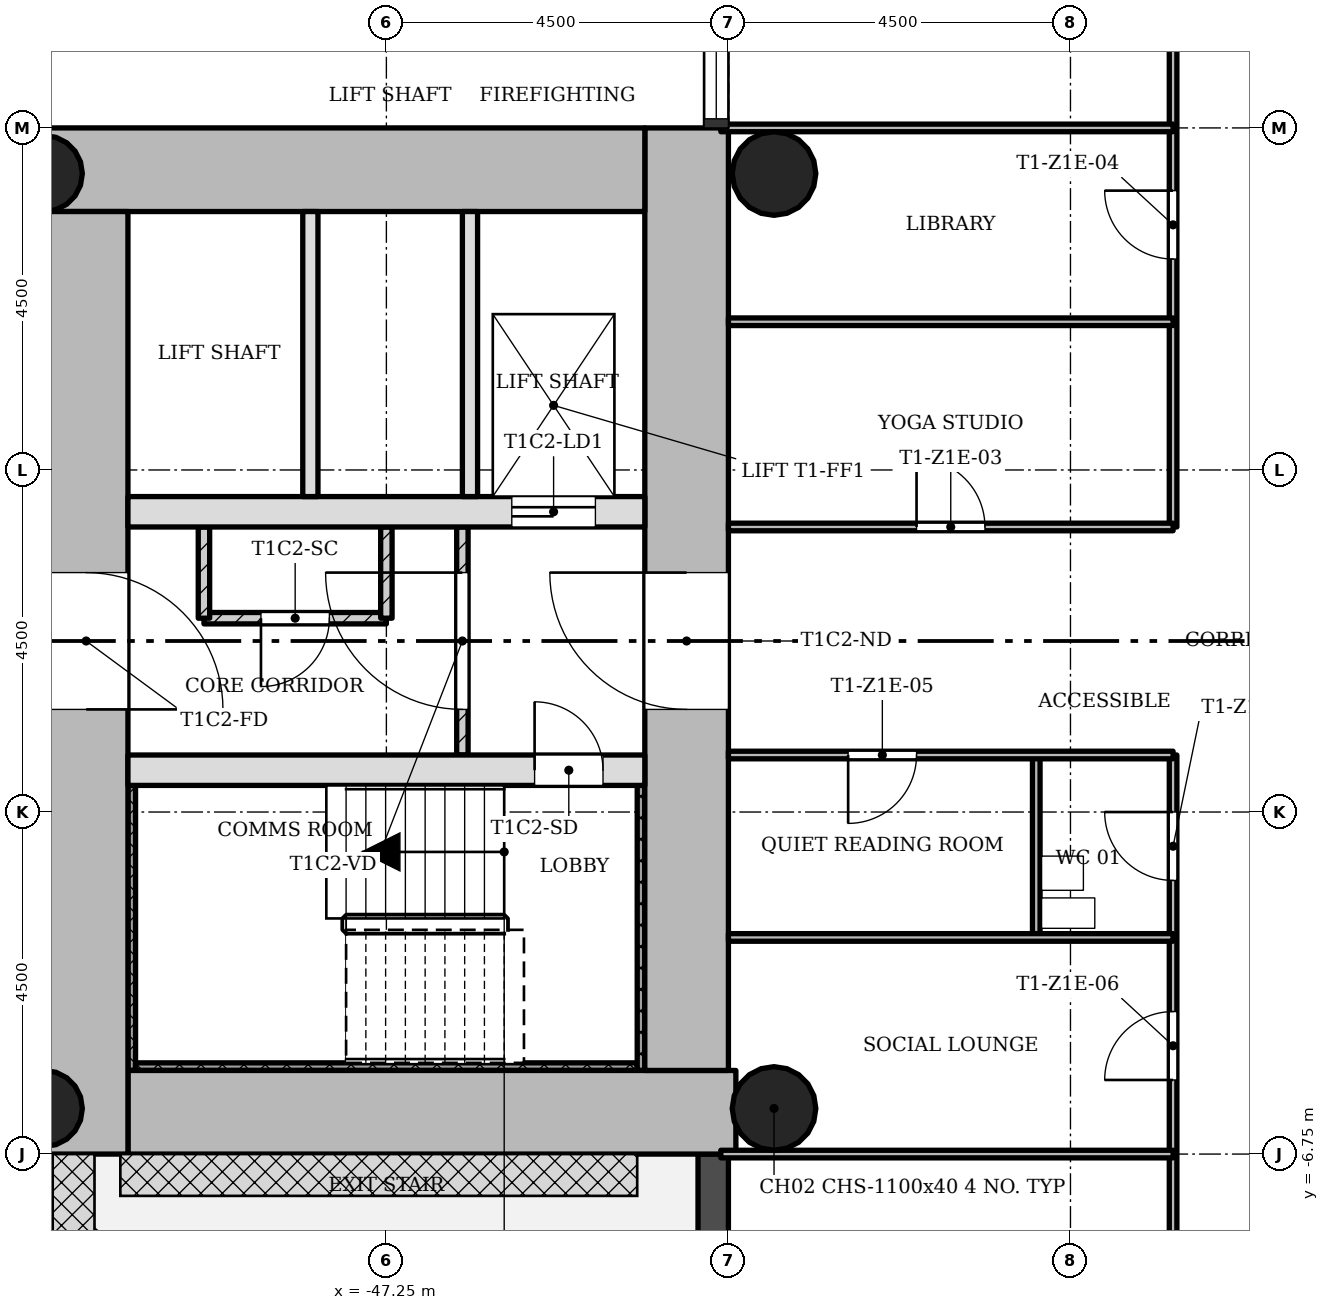
"""IFC4 building model, lengths in metres.
Left out: names, types, materials, properties, quantities, classifications, styles, units other than length and angle.
Written with IfcOpenShell. Run it as: python <this file> out.ifc"""

import sys

from ifc_helpers import new_model, si_unit, direction, frame, frame_2d, origin, origin_2d, place, context, subcontext, project, spatial, rectangle, hollow_circle, extrude, element, fill, save


model = new_model("IFC4")
c1 = context("Model", 3, precision=1e-05, world=origin(), true_north=direction((0.0, 1.0)))
c2 = subcontext(c1, "Body", "Model", "MODEL_VIEW")
j1 = project(units=[si_unit("LENGTHUNIT", "METRE"), si_unit("PLANEANGLEUNIT", "RADIAN")], contexts=[c1])
p1 = place(None, origin())
s1 = spatial("IfcSite", under=j1, at=p1, CompositionType="ELEMENT")
p2 = place(p1, origin())
s2 = spatial("IfcBuilding", under=s1, at=p2, CompositionType="ELEMENT")
p3 = place(p2, frame((0.0, 0.0, 65.3)))
s3 = spatial("IfcBuildingStorey", under=s2, at=p3, CompositionType="ELEMENT", Elevation=65.3)
p4 = place(p3, frame((-50.65, -6.2, 0.0), z_axis=(0.0, 0.0, 1.0), x_axis=(1.0, 0.0, 0.0)))
e1 = element("IfcWall", 1, at=p4, inside=s3, PredefinedType="SHEAR", context=c2, shape_type="SweptSolid", body=[
    extrude(rectangle(XDim=7.998, YDim=1.1, at=frame_2d((3.999, 0.0))), origin(), (0.0, 0.0, 1.0), 3.4),
])
p5 = place(p3, frame((-43.3, -5.65, 0.0), z_axis=(0.0, 0.0, 1.0), x_axis=(0.0, 1.0, 0.0)))
e2 = element("IfcWall", 2, at=p5, inside=s3, PredefinedType="SHEAR", context=c2, shape_type="SweptSolid", body=[
    extrude(rectangle(XDim=12.4, YDim=1.1, at=frame_2d((6.2, 0.0))), origin(), (0.0, 0.0, 1.0), 3.4),
])
p6 = place(p5, frame((4.75, 0.0, 0.0)))
e3 = element("IfcOpeningElement", 3, at=p6, cuts=e2, PredefinedType="OPENING", context=c2, shape_type="SweptSolid", body=[
    extrude(rectangle(XDim=1.8, YDim=2.1, at=frame_2d((0.9, 1.05))), frame((0.0, 0.56, 0.0), z_axis=(0.0, -1.0, 0.0), x_axis=(1.0, 0.0, 0.0)), (0.0, 0.0, 1.0), 1.12),
])
p7 = place(p3, frame((-43.85, 6.2, 0.0), z_axis=(0.0, 0.0, 1.0), x_axis=(-1.0, 0.0, 0.0)))
e4 = element("IfcWall", 4, at=p7, inside=s3, PredefinedType="SHEAR", context=c2, shape_type="SweptSolid", body=[
    extrude(rectangle(XDim=7.9, YDim=1.1, at=frame_2d((3.95, 0.0))), origin(), (0.0, 0.0, 1.0), 3.4),
])
p8 = place(p3, frame((-51.2, 5.65, 0.0), z_axis=(0.0, 0.0, 1.0), x_axis=(0.0, -1.0, 0.0)))
e5 = element("IfcWall", 5, at=p8, inside=s3, PredefinedType="SHEAR", context=c2, shape_type="SweptSolid", body=[
    extrude(rectangle(XDim=12.4, YDim=1.1, at=frame_2d((6.2, 0.0))), origin(), (0.0, 0.0, 1.0), 3.4),
])
p9 = place(p8, frame((4.75, 0.0, 0.0)))
e6 = element("IfcOpeningElement", 6, at=p9, cuts=e5, PredefinedType="OPENING", context=c2, shape_type="SweptSolid", body=[
    extrude(rectangle(XDim=1.8, YDim=2.1, at=frame_2d((0.9, 1.05))), frame((0.0, 0.56, 0.0), z_axis=(0.0, -1.0, 0.0), x_axis=(1.0, 0.0, 0.0)), (0.0, 0.0, 1.0), 1.12),
])
p10 = place(p3, frame((-50.65, -1.7, 0.0), z_axis=(0.0, 0.0, 1.0), x_axis=(1.0, 0.0, 0.0)))
e7 = element("IfcWall", 7, at=p10, inside=s3, PredefinedType="SHEAR", context=c2, shape_type="SweptSolid", body=[
    extrude(rectangle(XDim=6.8, YDim=0.4, at=frame_2d((3.4, 0.0))), origin(), (0.0, 0.0, 1.0), 3.4),
])
p11 = place(p10, frame((5.35, 0.0, 0.0)))
e8 = element("IfcOpeningElement", 8, at=p11, cuts=e7, PredefinedType="OPENING", context=c2, shape_type="SweptSolid", body=[
    extrude(rectangle(XDim=0.9, YDim=2.1, at=frame_2d((0.45, 1.05))), frame((0.0, 0.21, 0.0), z_axis=(0.0, -1.0, 0.0), x_axis=(1.0, 0.0, 0.0)), (0.0, 0.0, 1.0), 0.42),
])
p12 = place(p3, frame((-50.65, 1.7, 0.0), z_axis=(0.0, 0.0, 1.0), x_axis=(1.0, 0.0, 0.0)))
e9 = element("IfcWall", 9, at=p12, inside=s3, PredefinedType="SHEAR", context=c2, shape_type="SweptSolid", body=[
    extrude(rectangle(XDim=6.8, YDim=0.4, at=frame_2d((3.4, 0.0))), origin(), (0.0, 0.0, 1.0), 3.4),
])
p13 = place(p12, frame((5.05, 0.0, 0.0)))
e10 = element("IfcOpeningElement", 10, at=p13, cuts=e9, PredefinedType="OPENING", context=c2, shape_type="SweptSolid", body=[
    extrude(rectangle(XDim=1.1, YDim=2.1, at=frame_2d((0.55, 1.05))), frame((0.0, 0.21, 0.0), z_axis=(0.0, -1.0, 0.0), x_axis=(1.0, 0.0, 0.0)), (0.0, 0.0, 1.0), 0.42),
])
for number, where, z_axis, x_axis in (
    (11, (-51.75, -6.15, 0.0), (0.0, 0.0, 1.0), (1.0, 0.0, 0.0)),
    (12, (-51.75, 6.15, 0.0), (0.0, 0.0, 1.0), (1.0, 0.0, 0.0)),
):
    element("IfcColumn", number, at=place(p3, frame(where, z_axis=z_axis, x_axis=x_axis)), inside=s3, PredefinedType="COLUMN", context=c2, shape_type="SweptSolid", body=[
        extrude(hollow_circle(Radius=0.5, WallThickness=0.036, at=origin_2d()), origin(), (0.0, 0.0, 1.0), 3.4),
    ])
for number, where, z_axis, x_axis in (
    (13, (-42.15, -6.15, 0.0), (0.0, 0.0, 1.0), (1.0, 0.0, 0.0)),
    (14, (-42.15, 6.15, 0.0), (0.0, 0.0, 1.0), (1.0, 0.0, 0.0)),
):
    element("IfcColumn", number, at=place(p3, frame(where, z_axis=z_axis, x_axis=x_axis)), inside=s3, PredefinedType="COLUMN", context=c2, shape_type="SweptSolid", body=[
        extrude(hollow_circle(Radius=0.55, WallThickness=0.04, at=origin_2d()), origin(), (0.0, 0.0, 1.0), 3.4),
    ])
p14 = place(p3, frame((-42.95, -6.75, -0.02), z_axis=(0.0, 0.0, 1.0), x_axis=(0.0, -1.0, 0.0)))
e15 = element("IfcWall", 15, at=p14, inside=s3, PredefinedType="STANDARD", context=c2, shape_type="SweptSolid", body=[
    extrude(rectangle(XDim=4.5, YDim=0.4, at=frame_2d((2.25, 0.0))), origin(), (0.0, 0.0, 1.0), 3.12),
])
p15 = place(p14, frame((1.35, 0.0, 0.02)))
e16 = element("IfcOpeningElement", 16, at=p15, cuts=e15, PredefinedType="OPENING", context=c2, shape_type="SweptSolid", body=[
    extrude(rectangle(XDim=1.8, YDim=2.1, at=frame_2d((0.9, 1.05))), frame((0.0, 0.21, 0.0), z_axis=(0.0, -1.0, 0.0), x_axis=(1.0, 0.0, 0.0)), (0.0, 0.0, 1.0), 0.42),
])
p16 = place(p3, frame((-46.25, 1.5, 0.0), z_axis=(0.0, 0.0, 1.0), x_axis=(0.0, -1.0, 0.0)))
e17 = element("IfcWall", 17, at=p16, inside=s3, PredefinedType="PARTITIONING", context=c2, shape_type="SweptSolid", body=[
    extrude(rectangle(XDim=3.0, YDim=0.15, at=frame_2d((1.5, 0.0))), origin(), (0.0, 0.0, 1.0), 3.0),
])
p17 = place(p16, frame((0.6, 0.0, 0.0)))
e18 = element("IfcOpeningElement", 18, at=p17, cuts=e17, PredefinedType="OPENING", context=c2, shape_type="SweptSolid", body=[
    extrude(rectangle(XDim=1.8, YDim=2.1, at=frame_2d((0.9, 1.05))), frame((0.0, 0.085, 0.0), z_axis=(0.0, -1.0, 0.0), x_axis=(1.0, 0.0, 0.0)), (0.0, 0.0, 1.0), 0.17),
])
for number, where, z_axis, x_axis in (
    (19, (-46.15, 5.65, 0.0), (0.0, 0.0, 1.0), (0.0, -1.0, 0.0)),
    (20, (-48.25, 5.65, 0.0), (0.0, 0.0, 1.0), (0.0, -1.0, 0.0)),
):
    element("IfcWall", number, at=place(p3, frame(where, z_axis=z_axis, x_axis=x_axis)), inside=s3, PredefinedType="SOLIDWALL", context=c2, shape_type="SweptSolid", body=[
        extrude(rectangle(XDim=3.75, YDim=0.2, at=frame_2d((1.875, 0.0))), origin(), (0.0, 0.0, 1.0), 3.0),
    ])
p18 = place(p3, frame((-47.25, 0.3, 0.0), z_axis=(0.0, 0.0, 1.0), x_axis=(-1.0, 0.0, 0.0)))
e21 = element("IfcWall", 21, at=p18, inside=s3, PredefinedType="PARTITIONING", context=c2, shape_type="SweptSolid", body=[
    extrude(rectangle(XDim=2.4, YDim=0.15, at=frame_2d((1.2, 0.0))), origin(), (0.0, 0.0, 1.0), 3.0),
])
p19 = place(p18, frame((0.75, 0.0, 0.0)))
e22 = element("IfcOpeningElement", 22, at=p19, cuts=e21, PredefinedType="OPENING", context=c2, shape_type="SweptSolid", body=[
    extrude(rectangle(XDim=0.9, YDim=2.1, at=frame_2d((0.45, 1.05))), frame((0.0, 0.085, 0.0), z_axis=(0.0, -1.0, 0.0), x_axis=(1.0, 0.0, 0.0)), (0.0, 0.0, 1.0), 0.17),
])
for number, where, z_axis, x_axis in (
    (23, (-47.25, 0.3, 0.0), (0.0, 0.0, 1.0), (0.0, 1.0, 0.0)),
    (24, (-49.65, 0.3, 0.0), (0.0, 0.0, 1.0), (0.0, 1.0, 0.0)),
):
    element("IfcWall", number, at=place(p3, frame(where, z_axis=z_axis, x_axis=x_axis)), inside=s3, PredefinedType="PARTITIONING", context=c2, shape_type="SweptSolid", body=[
        extrude(rectangle(XDim=1.2, YDim=0.15, at=frame_2d((0.6, 0.0))), origin(), (0.0, 0.0, 1.0), 3.0),
    ])
p20 = place(p3, frame((-38.7, -3.9, 0.0), z_axis=(0.0, 0.0, 1.0), x_axis=(0.0, 1.0, 0.0)))
e25 = element("IfcWall", 25, at=p20, inside=s3, PredefinedType="PARTITIONING", context=c2, shape_type="SweptSolid", body=[
    extrude(rectangle(XDim=2.4, YDim=0.1, at=frame_2d((1.2, 0.0))), origin(), (0.0, 0.0, 1.0), 3.0),
])
p21 = place(p3, frame((-36.9, -8.55, 0.0), z_axis=(0.0, 0.0, 1.0), x_axis=(0.0, 1.0, 0.0)))
e26 = element("IfcWall", 26, at=p21, inside=s3, PredefinedType="PARTITIONING", context=c2, shape_type="SweptSolid", body=[
    extrude(rectangle(XDim=7.05, YDim=0.1, at=frame_2d((3.525, 0.0))), origin(), (0.0, 0.0, 1.0), 3.0),
])
p22 = place(p21, frame((5.4, 0.0, 0.0)))
e27 = element("IfcOpeningElement", 27, at=p22, cuts=e26, PredefinedType="OPENING", context=c2, shape_type="SweptSolid", body=[
    extrude(rectangle(XDim=0.9, YDim=2.1, at=frame_2d((0.45, 1.05))), frame((0.0, 0.06, 0.0), z_axis=(0.0, -1.0, 0.0), x_axis=(1.0, 0.0, 0.0)), (0.0, 0.0, 1.0), 0.12),
])
p23 = place(p21, frame((2.775, 0.0, 0.0)))
e28 = element("IfcOpeningElement", 28, at=p23, cuts=e26, PredefinedType="OPENING", context=c2, shape_type="SweptSolid", body=[
    extrude(rectangle(XDim=0.9, YDim=2.1, at=frame_2d((0.45, 1.05))), frame((0.0, 0.06, 0.0), z_axis=(0.0, -1.0, 0.0), x_axis=(1.0, 0.0, 0.0)), (0.0, 0.0, 1.0), 0.12),
])
p24 = place(p3, frame((-36.9, 1.5, 0.0), z_axis=(0.0, 0.0, 1.0), x_axis=(0.0, 1.0, 0.0)))
e29 = element("IfcWall", 29, at=p24, inside=s3, PredefinedType="PARTITIONING", context=c2, shape_type="SweptSolid", body=[
    extrude(rectangle(XDim=7.05, YDim=0.1, at=frame_2d((3.525, 0.0))), origin(), (0.0, 0.0, 1.0), 3.0),
])
p25 = place(p24, frame((3.525, 0.0, 0.0)))
e30 = element("IfcOpeningElement", 30, at=p25, cuts=e29, PredefinedType="OPENING", context=c2, shape_type="SweptSolid", body=[
    extrude(rectangle(XDim=0.9, YDim=2.1, at=frame_2d((0.45, 1.05))), frame((0.0, 0.06, 0.0), z_axis=(0.0, -1.0, 0.0), x_axis=(1.0, 0.0, 0.0)), (0.0, 0.0, 1.0), 0.12),
])
p26 = place(p3, frame((-42.85, -6.75, 0.0), z_axis=(0.0, 0.0, 1.0), x_axis=(1.0, 0.0, 0.0)))
e31 = element("IfcWall", 31, at=p26, inside=s3, PredefinedType="PARTITIONING", context=c2, shape_type="SweptSolid", body=[
    extrude(rectangle(XDim=5.95, YDim=0.1, at=frame_2d((2.975, 0.0))), origin(), (0.0, 0.0, 1.0), 3.0),
])
p27 = place(p3, frame((-42.75, -3.9, 0.0), z_axis=(0.0, 0.0, 1.0), x_axis=(1.0, 0.0, 0.0)))
e32 = element("IfcWall", 32, at=p27, inside=s3, PredefinedType="PARTITIONING", context=c2, shape_type="SweptSolid", body=[
    extrude(rectangle(XDim=5.85, YDim=0.1, at=frame_2d((2.925, 0.0))), origin(), (0.0, 0.0, 1.0), 3.0),
])
p28 = place(p3, frame((-42.75, -1.5, 0.0), z_axis=(0.0, 0.0, 1.0), x_axis=(1.0, 0.0, 0.0)))
e33 = element("IfcWall", 33, at=p28, inside=s3, PredefinedType="PARTITIONING", context=c2, shape_type="SweptSolid", body=[
    extrude(rectangle(XDim=5.85, YDim=0.1, at=frame_2d((2.925, 0.0))), origin(), (0.0, 0.0, 1.0), 3.0),
])
p29 = place(p28, frame((1.575, 0.0, 0.0)))
e34 = element("IfcOpeningElement", 34, at=p29, cuts=e33, PredefinedType="OPENING", context=c2, shape_type="SweptSolid", body=[
    extrude(rectangle(XDim=0.9, YDim=2.1, at=frame_2d((0.45, 1.05))), frame((0.0, 0.06, 0.0), z_axis=(0.0, -1.0, 0.0), x_axis=(1.0, 0.0, 0.0)), (0.0, 0.0, 1.0), 0.12),
])
p30 = place(p3, frame((-42.75, 1.5, 0.0), z_axis=(0.0, 0.0, 1.0), x_axis=(1.0, 0.0, 0.0)))
e35 = element("IfcWall", 35, at=p30, inside=s3, PredefinedType="PARTITIONING", context=c2, shape_type="SweptSolid", body=[
    extrude(rectangle(XDim=5.85, YDim=0.1, at=frame_2d((2.925, 0.0))), origin(), (0.0, 0.0, 1.0), 3.0),
])
p31 = place(p30, frame((2.475, 0.0, 0.0)))
e36 = element("IfcOpeningElement", 36, at=p31, cuts=e35, PredefinedType="OPENING", context=c2, shape_type="SweptSolid", body=[
    extrude(rectangle(XDim=0.9, YDim=2.1, at=frame_2d((0.45, 1.05))), frame((0.0, 0.06, 0.0), z_axis=(0.0, -1.0, 0.0), x_axis=(1.0, 0.0, 0.0)), (0.0, 0.0, 1.0), 0.12),
])
p32 = place(p3, frame((-42.75, 4.2, 0.0), z_axis=(0.0, 0.0, 1.0), x_axis=(1.0, 0.0, 0.0)))
e37 = element("IfcWall", 37, at=p32, inside=s3, PredefinedType="PARTITIONING", context=c2, shape_type="SweptSolid", body=[
    extrude(rectangle(XDim=5.85, YDim=0.1, at=frame_2d((2.925, 0.0))), origin(), (0.0, 0.0, 1.0), 3.0),
])
p33 = place(p3, frame((-42.85, 6.75, 0.0), z_axis=(0.0, 0.0, 1.0), x_axis=(1.0, 0.0, 0.0)))
e38 = element("IfcWall", 38, at=p33, inside=s3, PredefinedType="PARTITIONING", context=c2, shape_type="SweptSolid", body=[
    extrude(rectangle(XDim=5.95, YDim=0.1, at=frame_2d((2.975, 0.0))), origin(), (0.0, 0.0, 1.0), 3.0),
])
p34 = place(p3, frame((-50.6, -1.9, 0.0), z_axis=(0.0, 0.0, 1.0), x_axis=(0.0, -1.0, 0.0)))
e39 = element("IfcWall", 39, at=p34, inside=s3, PredefinedType="SHEAR", context=c2, shape_type="SweptSolid", body=[
    extrude(rectangle(XDim=3.75, YDim=0.1, at=frame_2d((1.875, 0.0))), origin(), (0.0, 0.0, 1.0), 3.4),
])
p35 = place(p3, frame((-43.95, -5.6, 0.0), z_axis=(0.0, 0.0, 1.0), x_axis=(-1.0, 0.0, 0.0)))
e40 = element("IfcWall", 40, at=p35, inside=s3, PredefinedType="SHEAR", context=c2, shape_type="SweptSolid", body=[
    extrude(rectangle(XDim=6.6, YDim=0.1, at=frame_2d((3.3, 0.0))), origin(), (0.0, 0.0, 1.0), 3.4),
])
p36 = place(p3, frame((-43.9, -1.9, 0.0), z_axis=(0.0, 0.0, 1.0), x_axis=(0.0, -1.0, 0.0)))
e41 = element("IfcWall", 41, at=p36, inside=s3, PredefinedType="SHEAR", context=c2, shape_type="SweptSolid", body=[
    extrude(rectangle(XDim=3.75, YDim=0.1, at=frame_2d((1.875, 0.0))), origin(), (0.0, 0.0, 1.0), 3.4),
])
p37 = place(p17, origin())
e42 = element("IfcDoor", 42, at=p37, inside=s3, OperationType="SINGLE_SWING_LEFT", PredefinedType="DOOR", context=c2, shape_type="SweptSolid", body=[
    extrude(rectangle(XDim=1.8, YDim=2.1, at=frame_2d((0.9, 1.05))), frame((0.0, 0.025, 0.0), z_axis=(0.0, -1.0, 0.0), x_axis=(1.0, 0.0, 0.0)), (0.0, 0.0, 1.0), 0.05),
])
fill(e18, e42)
p38 = place(p19, origin())
e43 = element("IfcDoor", 43, at=p38, inside=s3, OperationType="SINGLE_SWING_LEFT", PredefinedType="DOOR", context=c2, shape_type="SweptSolid", body=[
    extrude(rectangle(XDim=0.9, YDim=2.1, at=frame_2d((0.45, 1.05))), frame((0.0, 0.025, 0.0), z_axis=(0.0, -1.0, 0.0), x_axis=(1.0, 0.0, 0.0)), (0.0, 0.0, 1.0), 0.05),
])
fill(e22, e43)
p39 = place(p22, origin())
e44 = element("IfcDoor", 44, at=p39, inside=s3, OperationType="SINGLE_SWING_LEFT", PredefinedType="DOOR", context=c2, shape_type="SweptSolid", body=[
    extrude(rectangle(XDim=0.9, YDim=2.1, at=frame_2d((0.45, 1.05))), frame((0.0, 0.025, 0.0), z_axis=(0.0, -1.0, 0.0), x_axis=(1.0, 0.0, 0.0)), (0.0, 0.0, 1.0), 0.05),
])
fill(e27, e44)
p40 = place(p31, origin())
e45 = element("IfcDoor", 45, at=p40, inside=s3, OperationType="SINGLE_SWING_RIGHT", PredefinedType="DOOR", context=c2, shape_type="SweptSolid", body=[
    extrude(rectangle(XDim=0.9, YDim=2.1, at=frame_2d((0.45, 1.05))), frame((0.0, 0.025, 0.0), z_axis=(0.0, -1.0, 0.0), x_axis=(1.0, 0.0, 0.0)), (0.0, 0.0, 1.0), 0.05),
])
fill(e36, e45)
p41 = place(p25, origin())
e46 = element("IfcDoor", 46, at=p41, inside=s3, OperationType="SINGLE_SWING_LEFT", PredefinedType="DOOR", context=c2, shape_type="SweptSolid", body=[
    extrude(rectangle(XDim=0.9, YDim=2.1, at=frame_2d((0.45, 1.05))), frame((0.0, 0.025, 0.0), z_axis=(0.0, -1.0, 0.0), x_axis=(1.0, 0.0, 0.0)), (0.0, 0.0, 1.0), 0.05),
])
fill(e30, e46)
p42 = place(p29, origin())
e47 = element("IfcDoor", 47, at=p42, inside=s3, OperationType="SINGLE_SWING_LEFT", PredefinedType="DOOR", context=c2, shape_type="SweptSolid", body=[
    extrude(rectangle(XDim=0.9, YDim=2.1, at=frame_2d((0.45, 1.05))), frame((0.0, 0.025, 0.0), z_axis=(0.0, -1.0, 0.0), x_axis=(1.0, 0.0, 0.0)), (0.0, 0.0, 1.0), 0.05),
])
fill(e34, e47)
p43 = place(p23, origin())
e48 = element("IfcDoor", 48, at=p43, inside=s3, OperationType="SINGLE_SWING_RIGHT", PredefinedType="DOOR", context=c2, shape_type="SweptSolid", body=[
    extrude(rectangle(XDim=0.9, YDim=2.1, at=frame_2d((0.45, 1.05))), frame((0.0, 0.025, 0.0), z_axis=(0.0, -1.0, 0.0), x_axis=(1.0, 0.0, 0.0)), (0.0, 0.0, 1.0), 0.05),
])
fill(e28, e48)
p44 = place(p11, origin())
e49 = element("IfcDoor", 49, at=p44, inside=s3, OperationType="SINGLE_SWING_RIGHT", PredefinedType="DOOR", context=c2, shape_type="SweptSolid", body=[
    extrude(rectangle(XDim=0.9, YDim=2.1, at=frame_2d((0.45, 1.05))), frame((0.0, 0.025, 0.0), z_axis=(0.0, -1.0, 0.0), x_axis=(1.0, 0.0, 0.0)), (0.0, 0.0, 1.0), 0.05),
])
fill(e8, e49)
p45 = place(p13, origin())
e50 = element("IfcDoor", 50, at=p45, inside=s3, OperationType="SLIDING_TO_LEFT", PredefinedType="DOOR", context=c2, shape_type="SweptSolid", body=[
    extrude(rectangle(XDim=1.1, YDim=2.1, at=frame_2d((0.55, 1.05))), frame((0.0, 0.025, 0.0), z_axis=(0.0, -1.0, 0.0), x_axis=(1.0, 0.0, 0.0)), (0.0, 0.0, 1.0), 0.05),
])
fill(e10, e50)
p46 = place(p6, origin())
e51 = element("IfcDoor", 51, at=p46, inside=s3, OperationType="SINGLE_SWING_LEFT", PredefinedType="DOOR", context=c2, shape_type="SweptSolid", body=[
    extrude(rectangle(XDim=1.8, YDim=2.1, at=frame_2d((0.9, 1.05))), frame((0.0, 0.025, 0.0), z_axis=(0.0, -1.0, 0.0), x_axis=(1.0, 0.0, 0.0)), (0.0, 0.0, 1.0), 0.05),
])
fill(e3, e51)
p47 = place(p9, origin())
e52 = element("IfcDoor", 52, at=p47, inside=s3, OperationType="SINGLE_SWING_LEFT", PredefinedType="DOOR", context=c2, shape_type="SweptSolid", body=[
    extrude(rectangle(XDim=1.8, YDim=2.1, at=frame_2d((0.9, 1.05))), frame((0.0, 0.025, 0.0), z_axis=(0.0, -1.0, 0.0), x_axis=(1.0, 0.0, 0.0)), (0.0, 0.0, 1.0), 0.05),
])
fill(e6, e52)
save(model, sys.argv[1])
